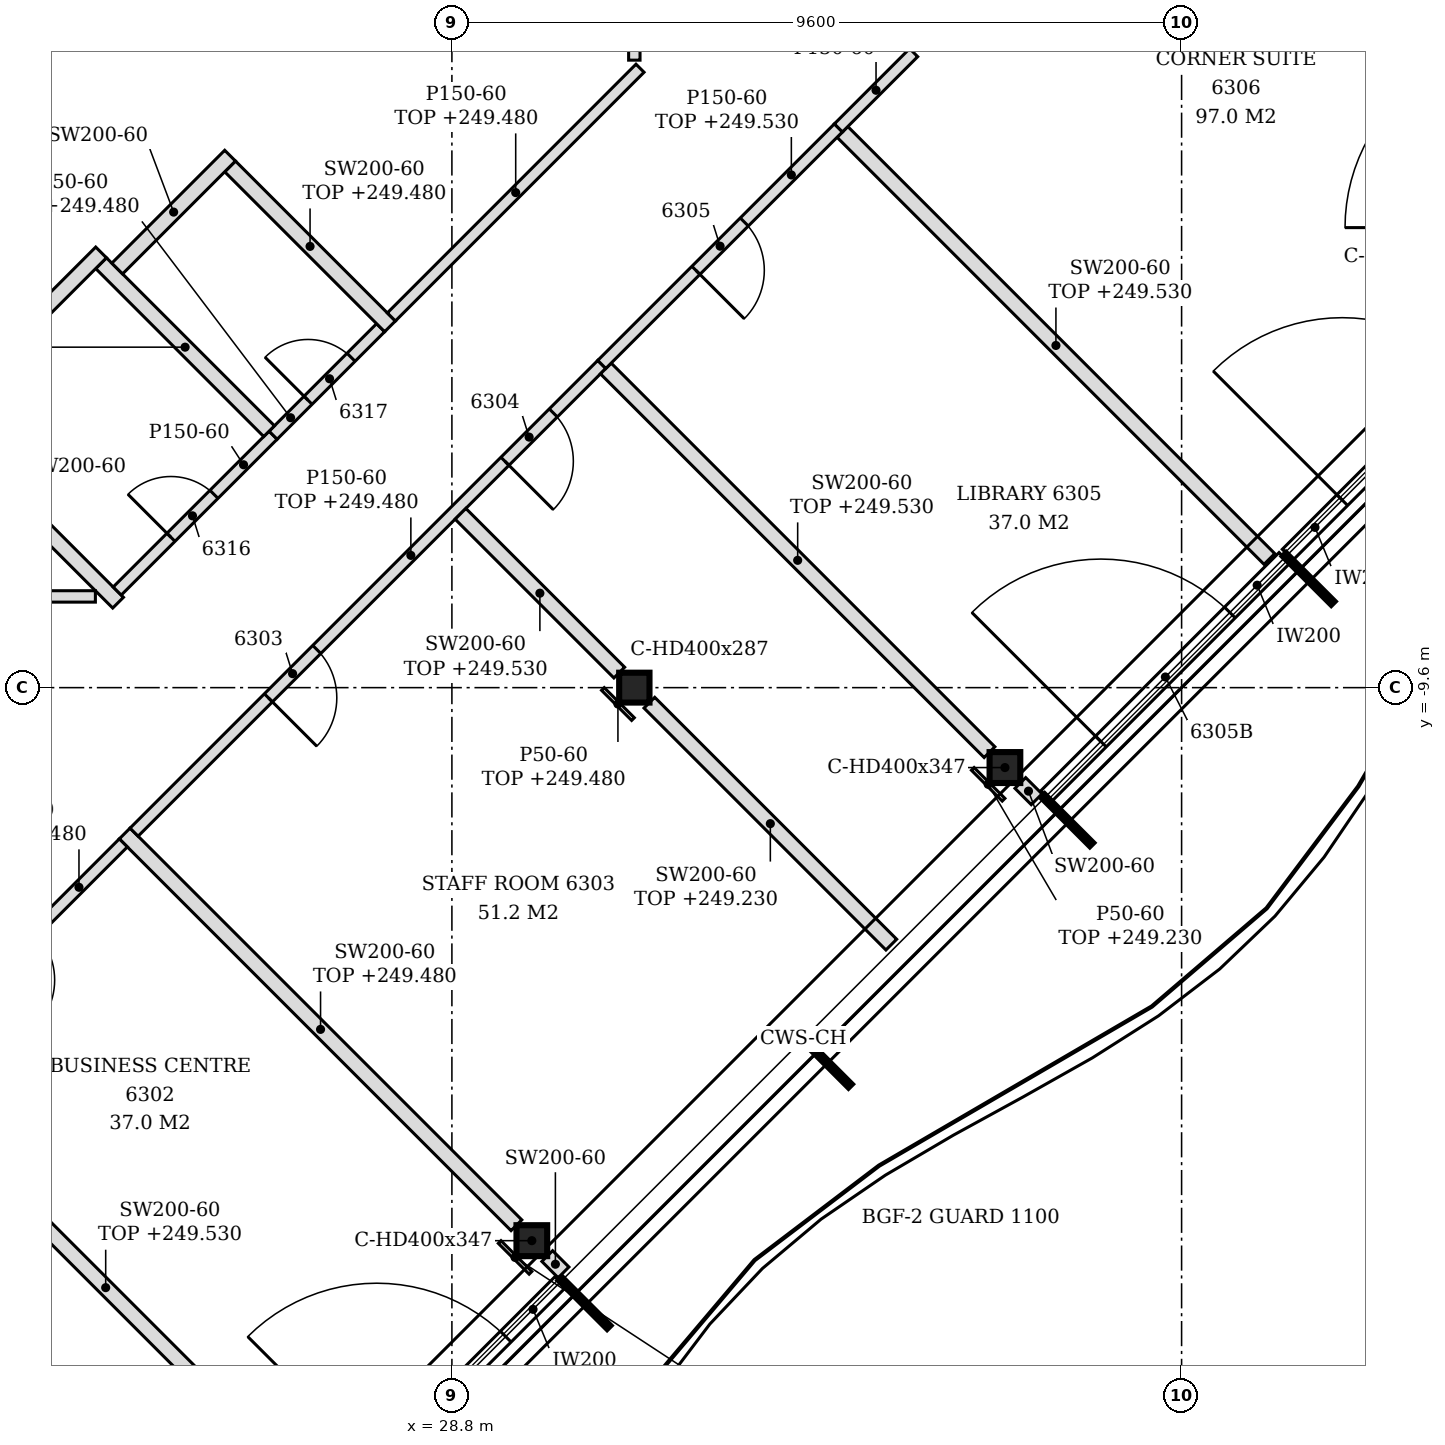
"""IFC4 building model, lengths in metres.
Left out: names, types, materials, properties, quantities, classifications, styles, units other than length and angle.
Written with IfcOpenShell. Run it as: python <this file> out.ifc"""

import sys

from ifc_helpers import new_model, si_unit, direction, frame, frame_2d, origin, origin_2d, place, context, subcontext, project, spatial, rectangle, i_section, extrude, element, fill, save


model = new_model("IFC4")
c1 = context("Model", 3, precision=1e-05, world=origin(), true_north=direction((0.0, 1.0)))
c2 = subcontext(c1, "Body", "Model", "MODEL_VIEW")
j1 = project(units=[si_unit("LENGTHUNIT", "METRE"), si_unit("PLANEANGLEUNIT", "RADIAN")], contexts=[c1])
p1 = place(None, origin())
s1 = spatial("IfcSite", under=j1, at=p1, CompositionType="ELEMENT")
p2 = place(p1, origin())
s2 = spatial("IfcBuilding", under=s1, at=p2, CompositionType="ELEMENT")
p3 = place(p2, frame((0.0, 0.0, 246.6)))
s3 = spatial("IfcBuildingStorey", under=s2, at=p3, CompositionType="ELEMENT", Elevation=246.6)
for number, where, z_axis, x_axis in (
    (1, (29.852, -16.876, -0.15), (0.0, 0.0, 1.0), (1.0, 0.0, 0.0)),
    (2, (36.076, -10.652, -0.15), (0.0, 0.0, 1.0), (1.0, 0.0, 0.0)),
):
    element("IfcColumn", number, at=place(p3, frame(where, z_axis=z_axis, x_axis=x_axis)), inside=s3, PredefinedType="COLUMN", context=c2, shape_type="SweptSolid", body=[
        extrude(i_section(OverallWidth=0.404, OverallDepth=0.407, WebThickness=0.027, FlangeThickness=0.044, FilletRadius=0.015, at=origin_2d()), origin(), (0.0, 0.0, 1.0), 3.6),
    ])
p4 = place(p3, frame((31.2, -9.6, -0.15), z_axis=(0.0, 0.0, 1.0), x_axis=(1.0, 0.0, 0.0)))
e3 = element("IfcColumn", 3, at=p4, inside=s3, PredefinedType="COLUMN", context=c2, shape_type="SweptSolid", body=[
    extrude(i_section(OverallWidth=0.399, OverallDepth=0.393, WebThickness=0.023, FlangeThickness=0.037, FilletRadius=0.015, at=origin_2d()), origin(), (0.0, 0.0, 1.0), 3.6),
])
p5 = place(p3, frame((27.093, -20.553, 0.0), z_axis=(0.0, 0.0, 1.0), x_axis=(0.707079231393, 0.707134329907, 0.0)))
e4 = element("IfcWall", 4, at=p5, inside=s3, PredefinedType="NOTDEFINED", context=c2, shape_type="SweptSolid", body=[
    extrude(rectangle(XDim=4.431, YDim=0.2, at=frame_2d((2.215, 0.0))), origin(), (0.0, 0.0, 1.0), 3.45),
])
p6 = place(p5, frame((1.015, 0.0, 0.0)))
e5 = element("IfcOpeningElement", 5, at=p6, cuts=e4, PredefinedType="OPENING", context=c2, shape_type="SweptSolid", body=[
    extrude(rectangle(XDim=2.4, YDim=2.4, at=frame_2d((1.2, 1.2))), frame((0.0, 0.11, 0.0), z_axis=(0.0, -1.0, 0.0), x_axis=(1.0, 0.0, 0.0)), (0.0, 0.0, 1.0), 0.22),
])
p7 = place(p3, frame((36.62, -11.026, 0.0), z_axis=(0.0, 0.0, 1.0), x_axis=(0.707106781187, 0.707106781187, 0.0)))
e6 = element("IfcWall", 6, at=p7, inside=s3, PredefinedType="NOTDEFINED", context=c2, shape_type="SweptSolid", body=[
    extrude(rectangle(XDim=4.431, YDim=0.2, at=frame_2d((2.215, 0.0))), origin(), (0.0, 0.0, 1.0), 3.45),
])
p8 = place(p7, frame((1.015, 0.0, 0.0)))
e7 = element("IfcOpeningElement", 7, at=p8, cuts=e6, PredefinedType="OPENING", context=c2, shape_type="SweptSolid", body=[
    extrude(rectangle(XDim=2.4, YDim=2.4, at=frame_2d((1.2, 1.2))), frame((0.0, 0.11, 0.0), z_axis=(0.0, -1.0, 0.0), x_axis=(1.0, 0.0, 0.0)), (0.0, 0.0, 1.0), 0.22),
])
p9 = place(p3, frame((39.796, -7.851, 0.0), z_axis=(0.0, 0.0, 1.0), x_axis=(0.707079168996, 0.707134392299, 0.0)))
e8 = element("IfcWall", 8, at=p9, inside=s3, PredefinedType="NOTDEFINED", context=c2, shape_type="SweptSolid", body=[
    extrude(rectangle(XDim=4.421, YDim=0.2, at=frame_2d((2.21, 0.0))), origin(), (0.0, 0.0, 1.0), 3.45),
])
p10 = place(p9, frame((1.016, 0.0, 0.0)))
e9 = element("IfcOpeningElement", 9, at=p10, cuts=e8, PredefinedType="OPENING", context=c2, shape_type="SweptSolid", body=[
    extrude(rectangle(XDim=2.4, YDim=2.4, at=frame_2d((1.2, 1.2))), frame((0.0, 0.11, 0.0), z_axis=(0.0, -1.0, 0.0), x_axis=(1.0, 0.0, 0.0)), (0.0, 0.0, 1.0), 0.22),
])
p11 = place(p3, frame((27.107, -20.355, 0.0), z_axis=(0.0, 0.0, 1.0), x_axis=(-0.707182179369, 0.707031374964, 0.0)))
e10 = element("IfcWall", 10, at=p11, inside=s3, PredefinedType="PARTITIONING", context=c2, shape_type="SweptSolid", body=[
    extrude(rectangle(XDim=8.095, YDim=0.2, at=frame_2d((4.047, 0.0))), origin(), (0.0, 0.0, 1.0), 2.93),
])
p12 = place(p3, frame((30.269, -17.293, 0.0), z_axis=(0.0, 0.0, 1.0), x_axis=(-0.707509117806, 0.706704215511, 0.0)))
e11 = element("IfcWall", 11, at=p12, inside=s3, PredefinedType="PARTITIONING", context=c2, shape_type="SweptSolid", body=[
    extrude(rectangle(XDim=0.303, YDim=0.2, at=frame_2d((0.152, 0.0))), origin(), (0.0, 0.0, 1.0), 3.45),
])
p13 = place(p3, frame((29.649, -16.673, 0.0), z_axis=(0.0, 0.0, 1.0), x_axis=(-0.707106781187, 0.707106781187, 0.0)))
e12 = element("IfcWall", 12, at=p13, inside=s3, PredefinedType="PARTITIONING", context=c2, shape_type="SweptSolid", body=[
    extrude(rectangle(XDim=7.289, YDim=0.2, at=frame_2d((3.644, 0.0))), origin(), (0.0, 0.0, 1.0), 2.88),
])
p14 = place(p3, frame((21.507, -14.614, 0.0), z_axis=(0.0, 0.0, 1.0), x_axis=(0.706990566745, 0.707222976531, 0.0)))
e13 = element("IfcWall", 13, at=p14, inside=s3, PredefinedType="PARTITIONING", context=c2, shape_type="SweptSolid", body=[
    extrude(rectangle(XDim=4.202, YDim=0.15, at=frame_2d((2.101, 0.0))), origin(), (0.0, 0.0, 1.0), 2.88),
])
p15 = place(p14, frame((1.651, 0.0, 0.0)))
e14 = element("IfcOpeningElement", 14, at=p15, cuts=e13, PredefinedType="OPENING", context=c2, shape_type="SweptSolid", body=[
    extrude(rectangle(XDim=0.9, YDim=2.1, at=frame_2d((0.45, 1.05))), frame((0.0, 0.085, 0.0), z_axis=(0.0, -1.0, 0.0), x_axis=(1.0, 0.0, 0.0)), (0.0, 0.0, 1.0), 0.17),
])
p16 = place(p3, frame((34.581, -12.981, 0.0), z_axis=(0.0, 0.0, 1.0), x_axis=(-0.707133900936, 0.707079660397, 0.0)))
e15 = element("IfcWall", 15, at=p16, inside=s3, PredefinedType="PARTITIONING", context=c2, shape_type="SweptSolid", body=[
    extrude(rectangle(XDim=4.501, YDim=0.2, at=frame_2d((2.25, 0.0))), origin(), (0.0, 0.0, 1.0), 2.63),
])
p17 = place(p3, frame((24.619, -11.501, 0.0), z_axis=(0.0, 0.0, 1.0), x_axis=(0.707106781187, 0.707106781187, 0.0)))
e16 = element("IfcWall", 16, at=p17, inside=s3, PredefinedType="PARTITIONING", context=c2, shape_type="SweptSolid", body=[
    extrude(rectangle(XDim=8.702, YDim=0.15, at=frame_2d((4.351, 0.0))), origin(), (0.0, 0.0, 1.0), 2.88),
])
p18 = place(p17, frame((2.499, 0.0, 0.0)))
e17 = element("IfcOpeningElement", 17, at=p18, cuts=e16, PredefinedType="OPENING", context=c2, shape_type="SweptSolid", body=[
    extrude(rectangle(XDim=0.9, YDim=2.1, at=frame_2d((0.45, 1.05))), frame((0.0, 0.085, 0.0), z_axis=(0.0, -1.0, 0.0), x_axis=(1.0, 0.0, 0.0)), (0.0, 0.0, 1.0), 0.17),
])
p19 = place(p17, frame((6.9, 0.0, 0.0)))
e18 = element("IfcOpeningElement", 18, at=p19, cuts=e16, PredefinedType="OPENING", context=c2, shape_type="SweptSolid", body=[
    extrude(rectangle(XDim=0.9, YDim=2.1, at=frame_2d((0.45, 1.05))), frame((0.0, 0.085, 0.0), z_axis=(0.0, -1.0, 0.0), x_axis=(1.0, 0.0, 0.0)), (0.0, 0.0, 1.0), 0.17),
])
p20 = place(p3, frame((36.493, -11.069, 0.0), z_axis=(0.0, 0.0, 1.0), x_axis=(-0.707106781187, 0.707106781187, 0.0)))
e19 = element("IfcWall", 19, at=p20, inside=s3, PredefinedType="PARTITIONING", context=c2, shape_type="SweptSolid", body=[
    extrude(rectangle(XDim=0.303, YDim=0.2, at=frame_2d((0.152, 0.0))), origin(), (0.0, 0.0, 1.0), 3.45),
])
p21 = place(p3, frame((35.873, -10.449, 0.0), z_axis=(0.0, 0.0, 1.0), x_axis=(-0.707089680867, 0.707123881093, 0.0)))
e20 = element("IfcWall", 20, at=p21, inside=s3, PredefinedType="PARTITIONING", context=c2, shape_type="SweptSolid", body=[
    extrude(rectangle(XDim=7.139, YDim=0.2, at=frame_2d((3.569, 0.0))), origin(), (0.0, 0.0, 1.0), 2.93),
])
p22 = place(p3, frame((31.002, -9.402, 0.0), z_axis=(0.0, 0.0, 1.0), x_axis=(-0.707065460118, 0.70714809984, 0.0)))
e21 = element("IfcWall", 21, at=p22, inside=s3, PredefinedType="PARTITIONING", context=c2, shape_type="SweptSolid", body=[
    extrude(rectangle(XDim=2.954, YDim=0.2, at=frame_2d((1.477, 0.0))), origin(), (0.0, 0.0, 1.0), 2.93),
])
p23 = place(p3, frame((24.408, -8.482, 0.0), z_axis=(0.0, 0.0, 1.0), x_axis=(-0.70692272029, 0.707290794184, 0.0)))
e22 = element("IfcWall", 22, at=p23, inside=s3, PredefinedType="PARTITIONING", context=c2, shape_type="SweptSolid", body=[
    extrude(rectangle(XDim=3.316, YDim=0.2, at=frame_2d((1.658, 0.0))), origin(), (0.0, 0.0, 1.0), 3.45),
])
p24 = place(p3, frame((21.215, -8.4, 0.0), z_axis=(0.0, 0.0, 1.0), x_axis=(1.0, 0.0, 0.0)))
e23 = element("IfcWall", 23, at=p24, inside=s3, PredefinedType="PARTITIONING", context=c2, shape_type="SweptSolid", body=[
    extrude(rectangle(XDim=2.895, YDim=0.15, at=frame_2d((1.447, 0.0))), origin(), (0.0, 0.0, 1.0), 3.45),
])
p25 = place(p3, frame((24.397, -8.329, 0.0), z_axis=(0.0, 0.0, 1.0), x_axis=(0.707275119896, 0.706938402391, 0.0)))
e24 = element("IfcWall", 24, at=p25, inside=s3, PredefinedType="PARTITIONING", context=c2, shape_type="SweptSolid", body=[
    extrude(rectangle(XDim=2.9, YDim=0.15, at=frame_2d((1.45, 0.0))), origin(), (0.0, 0.0, 1.0), 3.45),
])
p26 = place(p25, frame((1.0, 0.0, 0.0)))
e25 = element("IfcOpeningElement", 25, at=p26, cuts=e24, PredefinedType="OPENING", context=c2, shape_type="SweptSolid", body=[
    extrude(rectangle(XDim=0.8, YDim=2.1, at=frame_2d((0.4, 1.05))), frame((0.0, 0.085, 0.0), z_axis=(0.0, -1.0, 0.0), x_axis=(1.0, 0.0, 0.0)), (0.0, 0.0, 1.0), 0.17),
])
p27 = place(p3, frame((39.555, -7.907, 0.0), z_axis=(0.0, 0.0, 1.0), x_axis=(-0.707060685068, 0.7071528743, 0.0)))
e26 = element("IfcWall", 26, at=p27, inside=s3, PredefinedType="PARTITIONING", context=c2, shape_type="SweptSolid", body=[
    extrude(rectangle(XDim=7.945, YDim=0.2, at=frame_2d((3.972, 0.0))), origin(), (0.0, 0.0, 1.0), 2.93),
])
p28 = place(p3, frame((26.448, -6.279, 0.0), z_axis=(0.0, 0.0, 1.0), x_axis=(0.707106781187, 0.707106781187, 0.0)))
e27 = element("IfcWall", 27, at=p28, inside=s3, PredefinedType="PARTITIONING", context=c2, shape_type="SweptSolid", body=[
    extrude(rectangle(XDim=2.0, YDim=0.15, at=frame_2d((1.0, 0.0))), origin(), (0.0, 0.0, 1.0), 2.88),
])
p29 = place(p28, frame((0.65, 0.0, 0.0)))
e28 = element("IfcOpeningElement", 28, at=p29, cuts=e27, PredefinedType="OPENING", context=c2, shape_type="SweptSolid", body=[
    extrude(rectangle(XDim=0.8, YDim=2.1, at=frame_2d((0.4, 1.05))), frame((0.0, 0.085, 0.0), z_axis=(0.0, -1.0, 0.0), x_axis=(1.0, 0.0, 0.0)), (0.0, 0.0, 1.0), 0.17),
])
p30 = place(p3, frame((26.395, -6.226, 0.0), z_axis=(0.0, 0.0, 1.0), x_axis=(-0.707067728538, 0.707145831678, 0.0)))
e29 = element("IfcWall", 29, at=p30, inside=s3, PredefinedType="PARTITIONING", context=c2, shape_type="SweptSolid", body=[
    extrude(rectangle(XDim=3.126, YDim=0.2, at=frame_2d((1.563, 0.0))), origin(), (0.0, 0.0, 1.0), 2.88),
])
p31 = place(p3, frame((21.922, -6.137, 0.0), z_axis=(0.0, 0.0, 1.0), x_axis=(0.707106781187, 0.707106781187, 0.0)))
e30 = element("IfcWall", 30, at=p31, inside=s3, PredefinedType="PARTITIONING", context=c2, shape_type="SweptSolid", body=[
    extrude(rectangle(XDim=3.2, YDim=0.2, at=frame_2d((1.6, 0.0))), origin(), (0.0, 0.0, 1.0), 2.88),
])
p32 = place(p3, frame((30.772, -5.348, 0.0), z_axis=(0.0, 0.0, 1.0), x_axis=(0.70724543229, 0.706968102891, 0.0)))
e31 = element("IfcWall", 31, at=p32, inside=s3, PredefinedType="PARTITIONING", context=c2, shape_type="SweptSolid", body=[
    extrude(rectangle(XDim=4.402, YDim=0.15, at=frame_2d((2.201, 0.0))), origin(), (0.0, 0.0, 1.0), 2.93),
])
p33 = place(p32, frame((1.751, 0.0, 0.0)))
e32 = element("IfcOpeningElement", 32, at=p33, cuts=e31, PredefinedType="OPENING", context=c2, shape_type="SweptSolid", body=[
    extrude(rectangle(XDim=0.9, YDim=2.1, at=frame_2d((0.45, 1.05))), frame((0.0, 0.085, 0.0), z_axis=(0.0, -1.0, 0.0), x_axis=(1.0, 0.0, 0.0)), (0.0, 0.0, 1.0), 0.17),
])
p34 = place(p3, frame((27.986, -4.847, 0.0), z_axis=(0.0, 0.0, 1.0), x_axis=(-0.707147797851, 0.707065762143, 0.0)))
e33 = element("IfcWall", 33, at=p34, inside=s3, PredefinedType="PARTITIONING", context=c2, shape_type="SweptSolid", body=[
    extrude(rectangle(XDim=2.976, YDim=0.2, at=frame_2d((1.488, 0.0))), origin(), (0.0, 0.0, 1.0), 2.88),
])
p35 = place(p3, frame((28.004, -4.723, 0.0), z_axis=(0.0, 0.0, 1.0), x_axis=(0.706974860744, 0.707238677022, 0.0)))
e34 = element("IfcWall", 34, at=p35, inside=s3, PredefinedType="PARTITIONING", context=c2, shape_type="SweptSolid", body=[
    extrude(rectangle(XDim=4.627, YDim=0.15, at=frame_2d((2.313, 0.0))), origin(), (0.0, 0.0, 1.0), 2.88),
])
p36 = place(p3, frame((24.397, -4.086, 0.0), z_axis=(0.0, 0.0, 1.0), x_axis=(0.707106781187, 0.707106781187, 0.0)))
e35 = element("IfcWall", 35, at=p36, inside=s3, PredefinedType="PARTITIONING", context=c2, shape_type="SweptSolid", body=[
    extrude(rectangle(XDim=2.1, YDim=0.2, at=frame_2d((1.05, 0.0))), origin(), (0.0, 0.0, 1.0), 3.45),
])
p37 = place(p3, frame((33.885, -2.236, 0.0), z_axis=(0.0, 0.0, 1.0), x_axis=(0.707106781187, 0.707106781187, 0.0)))
e36 = element("IfcWall", 36, at=p37, inside=s3, PredefinedType="PARTITIONING", context=c2, shape_type="SweptSolid", body=[
    extrude(rectangle(XDim=1.4, YDim=0.15, at=frame_2d((0.7, 0.0))), origin(), (0.0, 0.0, 1.0), 3.45),
])
p38 = place(p3, frame((31.2, -1.345, 0.0), z_axis=(0.0, 0.0, 1.0), x_axis=(0.0, 1.0, 0.0)))
e37 = element("IfcWall", 37, at=p38, inside=s3, PredefinedType="PARTITIONING", context=c2, shape_type="SweptSolid", body=[
    extrude(rectangle(XDim=1.148, YDim=0.15, at=frame_2d((0.574, 0.0))), origin(), (0.0, 0.0, 1.0), 2.93),
])
p39 = place(p3, frame((29.834, -17.299, 0.0), z_axis=(0.0, 0.0, 1.0), x_axis=(-0.707106781187, 0.707106781187, 0.0)))
e38 = element("IfcWall", 38, at=p39, inside=s3, PredefinedType="PARTITIONING", context=c2, shape_type="SweptSolid", body=[
    extrude(rectangle(XDim=0.573, YDim=0.05, at=frame_2d((0.287, 0.0))), origin(), (0.0, 0.0, 1.0), 2.93),
])
p40 = place(p3, frame((31.182, -10.014, 0.0), z_axis=(0.0, 0.0, 1.0), x_axis=(-0.707106781187, 0.707106781187, 0.0)))
e39 = element("IfcWall", 39, at=p40, inside=s3, PredefinedType="PARTITIONING", context=c2, shape_type="SweptSolid", body=[
    extrude(rectangle(XDim=0.56, YDim=0.05, at=frame_2d((0.28, 0.0))), origin(), (0.0, 0.0, 1.0), 2.88),
])
p41 = place(p3, frame((36.058, -11.075, 0.0), z_axis=(0.0, 0.0, 1.0), x_axis=(-0.707106781187, 0.707106781187, 0.0)))
e40 = element("IfcWall", 40, at=p41, inside=s3, PredefinedType="PARTITIONING", context=c2, shape_type="SweptSolid", body=[
    extrude(rectangle(XDim=0.573, YDim=0.05, at=frame_2d((0.287, 0.0))), origin(), (0.0, 0.0, 1.0), 2.63),
])
p42 = place(p6, origin())
e41 = element("IfcDoor", 41, at=p42, inside=s3, OperationType="SINGLE_SWING_LEFT", PredefinedType="DOOR", context=c2, shape_type="SweptSolid", body=[
    extrude(rectangle(XDim=2.4, YDim=2.4, at=frame_2d((1.2, 1.2))), frame((0.0, 0.025, 0.0), z_axis=(0.0, -1.0, 0.0), x_axis=(1.0, 0.0, 0.0)), (0.0, 0.0, 1.0), 0.05),
])
fill(e5, e41)
p43 = place(p8, origin())
e42 = element("IfcDoor", 42, at=p43, inside=s3, OperationType="SINGLE_SWING_LEFT", PredefinedType="DOOR", context=c2, shape_type="SweptSolid", body=[
    extrude(rectangle(XDim=2.4, YDim=2.4, at=frame_2d((1.2, 1.2))), frame((0.0, 0.025, 0.0), z_axis=(0.0, -1.0, 0.0), x_axis=(1.0, 0.0, 0.0)), (0.0, 0.0, 1.0), 0.05),
])
fill(e7, e42)
p44 = place(p10, origin())
e43 = element("IfcDoor", 43, at=p44, inside=s3, OperationType="SINGLE_SWING_LEFT", PredefinedType="DOOR", context=c2, shape_type="SweptSolid", body=[
    extrude(rectangle(XDim=2.4, YDim=2.4, at=frame_2d((1.2, 1.2))), frame((0.0, 0.025, 0.0), z_axis=(0.0, -1.0, 0.0), x_axis=(1.0, 0.0, 0.0)), (0.0, 0.0, 1.0), 0.05),
])
fill(e9, e43)
p45 = place(p18, frame((0.9, 0.0, 0.0), z_axis=(0.0, 0.0, 1.0), x_axis=(-1.0, 0.0, 0.0)))
e44 = element("IfcDoor", 44, at=p45, inside=s3, OperationType="SINGLE_SWING_RIGHT", PredefinedType="DOOR", context=c2, shape_type="SweptSolid", body=[
    extrude(rectangle(XDim=0.9, YDim=2.1, at=frame_2d((0.45, 1.05))), frame((0.0, 0.025, 0.0), z_axis=(0.0, -1.0, 0.0), x_axis=(1.0, 0.0, 0.0)), (0.0, 0.0, 1.0), 0.05),
])
fill(e17, e44)
p46 = place(p19, frame((0.9, 0.0, 0.0), z_axis=(0.0, 0.0, 1.0), x_axis=(-1.0, 0.0, 0.0)))
e45 = element("IfcDoor", 45, at=p46, inside=s3, OperationType="SINGLE_SWING_RIGHT", PredefinedType="DOOR", context=c2, shape_type="SweptSolid", body=[
    extrude(rectangle(XDim=0.9, YDim=2.1, at=frame_2d((0.45, 1.05))), frame((0.0, 0.025, 0.0), z_axis=(0.0, -1.0, 0.0), x_axis=(1.0, 0.0, 0.0)), (0.0, 0.0, 1.0), 0.05),
])
fill(e18, e45)
p47 = place(p33, frame((0.9, 0.0, 0.0), z_axis=(0.0, 0.0, 1.0), x_axis=(-1.0, 0.0, 0.0)))
e46 = element("IfcDoor", 46, at=p47, inside=s3, OperationType="SINGLE_SWING_RIGHT", PredefinedType="DOOR", context=c2, shape_type="SweptSolid", body=[
    extrude(rectangle(XDim=0.9, YDim=2.1, at=frame_2d((0.45, 1.05))), frame((0.0, 0.025, 0.0), z_axis=(0.0, -1.0, 0.0), x_axis=(1.0, 0.0, 0.0)), (0.0, 0.0, 1.0), 0.05),
])
fill(e32, e46)
p48 = place(p26, origin())
e47 = element("IfcDoor", 47, at=p48, inside=s3, OperationType="SINGLE_SWING_LEFT", PredefinedType="DOOR", context=c2, shape_type="SweptSolid", body=[
    extrude(rectangle(XDim=0.8, YDim=2.1, at=frame_2d((0.4, 1.05))), frame((0.0, 0.025, 0.0), z_axis=(0.0, -1.0, 0.0), x_axis=(1.0, 0.0, 0.0)), (0.0, 0.0, 1.0), 0.05),
])
fill(e25, e47)
p49 = place(p29, origin())
e48 = element("IfcDoor", 48, at=p49, inside=s3, OperationType="SINGLE_SWING_LEFT", PredefinedType="DOOR", context=c2, shape_type="SweptSolid", body=[
    extrude(rectangle(XDim=0.8, YDim=2.1, at=frame_2d((0.4, 1.05))), frame((0.0, 0.025, 0.0), z_axis=(0.0, -1.0, 0.0), x_axis=(1.0, 0.0, 0.0)), (0.0, 0.0, 1.0), 0.05),
])
fill(e28, e48)
save(model, sys.argv[1])
